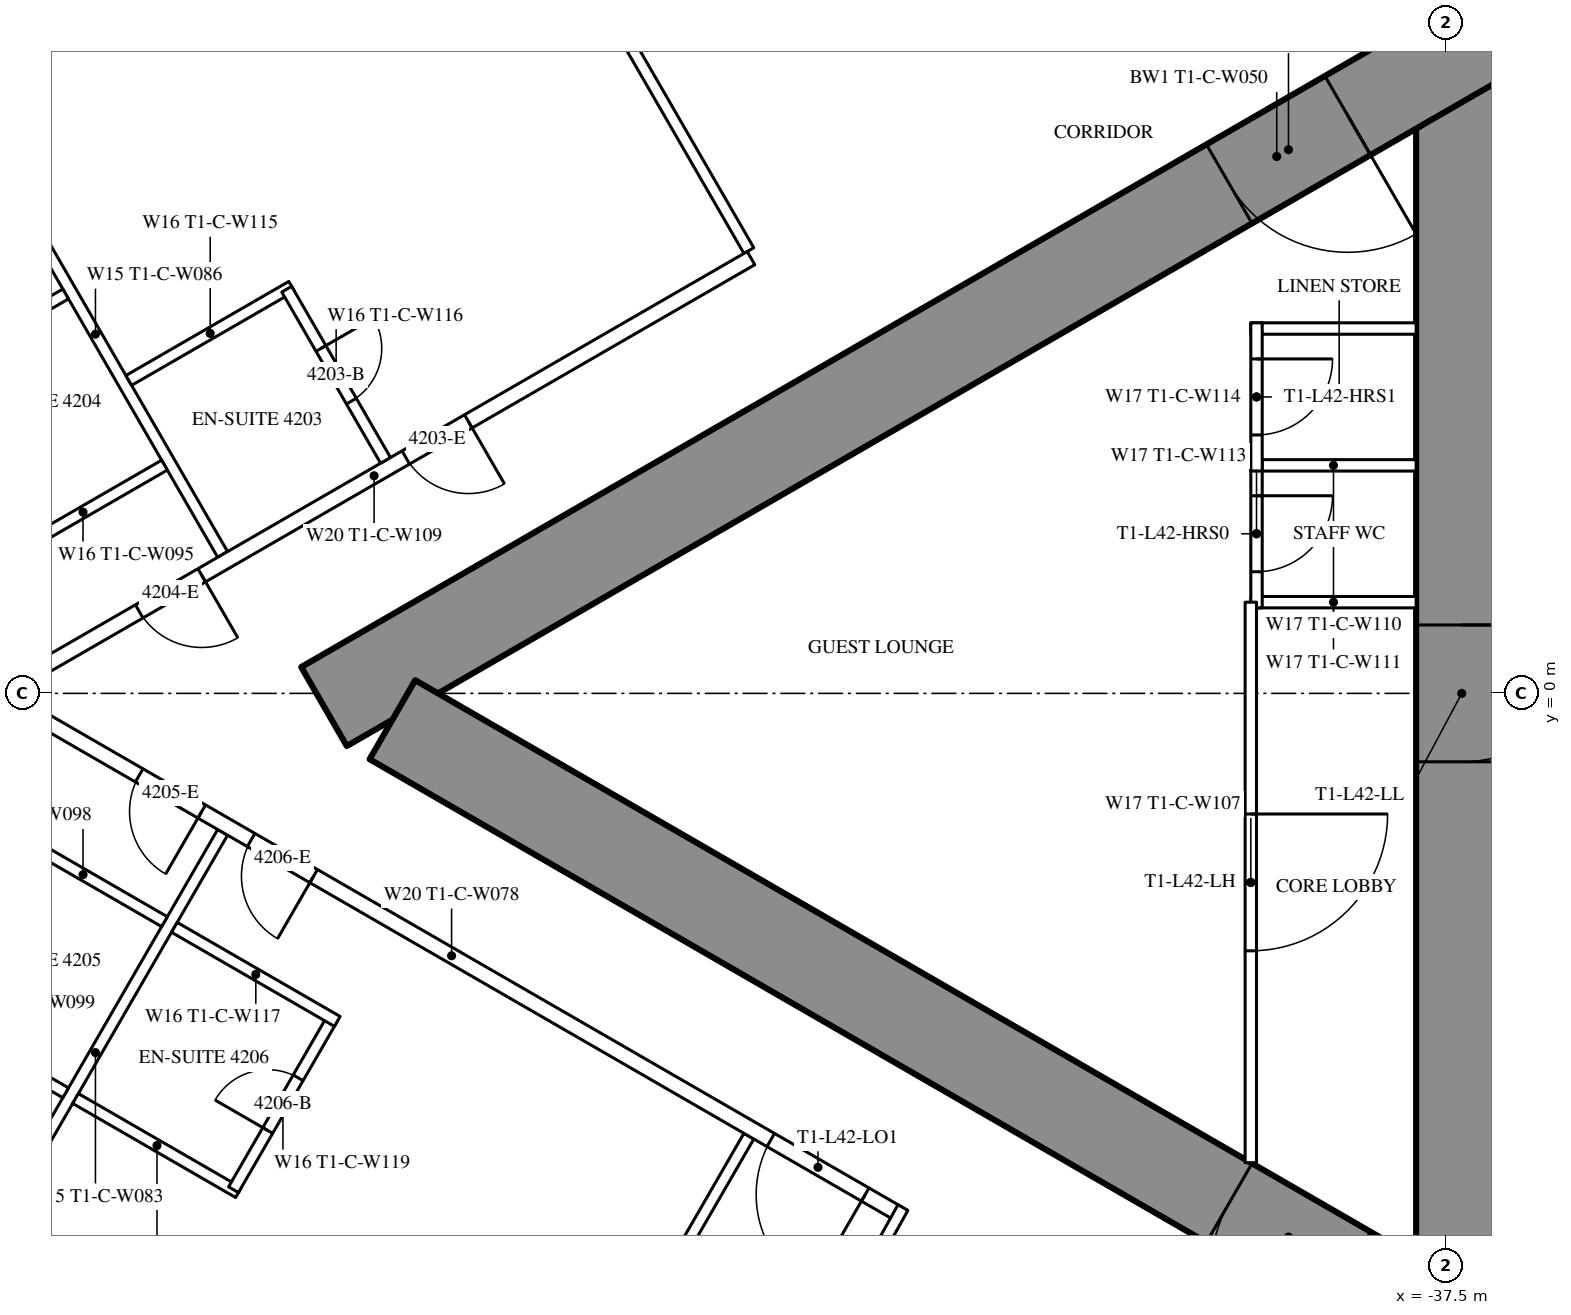
"""IFC4 building model, lengths in metres.
Left out: names, types, materials, properties, quantities, classifications, styles, units other than length and angle.
Written with IfcOpenShell. Run it as: python <this file> out.ifc"""

import sys

from ifc_helpers import new_model, si_unit, direction, frame, frame_2d, origin, place, context, subcontext, project, spatial, rectangle, extrude, element, fill, save


model = new_model("IFC4")
c1 = context("Model", 3, precision=1e-05, world=origin(), true_north=direction((0.0, 1.0)))
c2 = subcontext(c1, "Body", "Model", "MODEL_VIEW")
j1 = project(units=[si_unit("LENGTHUNIT", "METRE"), si_unit("PLANEANGLEUNIT", "RADIAN")], contexts=[c1])
p1 = place(None, origin())
s1 = spatial("IfcSite", under=j1, at=p1, CompositionType="ELEMENT")
p2 = place(p1, origin())
s2 = spatial("IfcBuilding", under=s1, at=p2, CompositionType="ELEMENT")
p3 = place(p2, frame((0.0, 0.0, 159.8)))
s3 = spatial("IfcBuildingStorey", under=s2, at=p3, CompositionType="ELEMENT", Elevation=159.8)
p4 = place(p3, frame((-37.3, 8.6, 0.0), z_axis=(0.0, 0.0, 1.0), x_axis=(0.0, -1.0, 0.0)))
e1 = element("IfcWall", 1, at=p4, inside=s3, PredefinedType="SHEAR", context=c2, shape_type="SweptSolid", body=[
    extrude(rectangle(XDim=17.2, YDim=1.2, at=frame_2d((8.6, 0.0))), origin(), (0.0, 0.0, 1.0), 3.5),
])
p5 = place(p4, frame((7.7, 0.0, 0.0)))
e2 = element("IfcOpeningElement", 2, at=p5, cuts=e1, PredefinedType="OPENING", context=c2, shape_type="SweptSolid", body=[
    extrude(rectangle(XDim=1.8, YDim=2.2, at=frame_2d((0.9, 1.1))), frame((0.0, 0.61, 0.0), z_axis=(0.0, -1.0, 0.0), x_axis=(1.0, 0.0, 0.0)), (0.0, 0.0, 1.0), 1.22),
])
p6 = place(p3, frame((-27.2, 14.3, 0.0), z_axis=(0.0, 0.0, 1.0), x_axis=(-0.866026593062, -0.499997940104, 0.0)))
e3 = element("IfcWall", 3, at=p6, inside=s3, PredefinedType="SHEAR", context=c2, shape_type="SweptSolid", body=[
    extrude(rectangle(XDim=28.946, YDim=1.2, at=frame_2d((14.473, 0.0))), origin(), (0.0, 0.0, 1.0), 3.5),
])
p7 = place(p6, frame((4.6, 0.0, 0.0)))
e4 = element("IfcOpeningElement", 4, at=p7, cuts=e3, PredefinedType="OPENING", context=c2, shape_type="SweptSolid", body=[
    extrude(rectangle(XDim=1.0, YDim=2.2, at=frame_2d((0.5, 1.1))), frame((0.0, 0.61, 0.0), z_axis=(0.0, -1.0, 0.0), x_axis=(1.0, 0.0, 0.0)), (0.0, 0.0, 1.0), 1.22),
])
p8 = place(p6, frame((13.395, 0.0, 0.0)))
e5 = element("IfcOpeningElement", 5, at=p8, cuts=e3, PredefinedType="OPENING", context=c2, shape_type="SweptSolid", body=[
    extrude(rectangle(XDim=1.8, YDim=2.2, at=frame_2d((0.9, 1.1))), frame((0.0, 0.61, 0.0), z_axis=(0.0, -1.0, 0.0), x_axis=(1.0, 0.0, 0.0)), (0.0, 0.0, 1.0), 1.22),
])
p9 = place(p3, frame((-27.2, -14.3, 0.0), z_axis=(0.0, 0.0, 1.0), x_axis=(-0.866024021859, 0.500002393557, 0.0)))
e6 = element("IfcWall", 6, at=p9, inside=s3, PredefinedType="SHEAR", context=c2, shape_type="SweptSolid", body=[
    extrude(rectangle(XDim=27.907, YDim=1.2, at=frame_2d((13.954, 0.0))), origin(), (0.0, 0.0, 1.0), 3.5),
])
p10 = place(p9, frame((4.6, 0.0, 0.0)))
e7 = element("IfcOpeningElement", 7, at=p10, cuts=e6, PredefinedType="OPENING", context=c2, shape_type="SweptSolid", body=[
    extrude(rectangle(XDim=1.0, YDim=2.2, at=frame_2d((0.5, 1.1))), frame((0.0, 0.61, 0.0), z_axis=(0.0, -1.0, 0.0), x_axis=(1.0, 0.0, 0.0)), (0.0, 0.0, 1.0), 1.22),
])
p11 = place(p9, frame((13.395, 0.0, 0.0)))
e8 = element("IfcOpeningElement", 8, at=p11, cuts=e6, PredefinedType="OPENING", context=c2, shape_type="SweptSolid", body=[
    extrude(rectangle(XDim=1.8, YDim=2.2, at=frame_2d((0.9, 1.1))), frame((0.0, 0.61, 0.0), z_axis=(0.0, -1.0, 0.0), x_axis=(1.0, 0.0, 0.0)), (0.0, 0.0, 1.0), 1.22),
])
p12 = place(p3, frame((-46.679, 5.825, 0.0), z_axis=(0.0, 0.0, 1.0), x_axis=(-0.500006839597, 0.866021454905, 0.0)))
e9 = element("IfcWall", 9, at=p12, inside=s3, PredefinedType="PARTITIONING", context=c2, shape_type="SweptSolid", body=[
    extrude(rectangle(XDim=6.911, YDim=0.15, at=frame_2d((3.456, 0.0))), origin(), (0.0, 0.0, 1.0), 2.3),
])
p13 = place(p3, frame((-53.602, 1.828, 0.0), z_axis=(0.0, 0.0, 1.0), x_axis=(-0.49999191814, 0.866030069798, 0.0)))
e10 = element("IfcWall", 10, at=p13, inside=s3, PredefinedType="PARTITIONING", context=c2, shape_type="SweptSolid", body=[
    extrude(rectangle(XDim=6.692, YDim=0.15, at=frame_2d((3.346, 0.0))), origin(), (0.0, 0.0, 1.0), 2.3),
])
p14 = place(p3, frame((-46.679, -5.825, 0.0), z_axis=(0.0, 0.0, 1.0), x_axis=(-0.500006839597, -0.866021454905, 0.0)))
e11 = element("IfcWall", 11, at=p14, inside=s3, PredefinedType="PARTITIONING", context=c2, shape_type="SweptSolid", body=[
    extrude(rectangle(XDim=6.911, YDim=0.15, at=frame_2d((3.456, 0.0))), origin(), (0.0, 0.0, 1.0), 2.3),
])
p15 = place(p3, frame((-53.602, -1.828, 0.0), z_axis=(0.0, 0.0, 1.0), x_axis=(-0.49999191814, -0.866030069798, 0.0)))
e12 = element("IfcWall", 12, at=p15, inside=s3, PredefinedType="PARTITIONING", context=c2, shape_type="SweptSolid", body=[
    extrude(rectangle(XDim=6.692, YDim=0.15, at=frame_2d((3.346, 0.0))), origin(), (0.0, 0.0, 1.0), 2.3),
])
p16 = place(p3, frame((-44.715, -6.844, 0.0), z_axis=(0.0, 0.0, 1.0), x_axis=(-0.866025261224, 0.500000246922, 0.0)))
e13 = element("IfcWall", 13, at=p16, inside=s3, PredefinedType="PARTITIONING", context=c2, shape_type="SweptSolid", body=[
    extrude(rectangle(XDim=13.567, YDim=0.2, at=frame_2d((6.783, 0.0))), origin(), (0.0, 0.0, 1.0), 3.25),
])
p17 = place(p16, frame((10.579, 0.0, 0.0)))
e14 = element("IfcOpeningElement", 14, at=p17, cuts=e13, PredefinedType="OPENING", context=c2, shape_type="SweptSolid", body=[
    extrude(rectangle(XDim=0.95, YDim=2.2, at=frame_2d((0.475, 1.1))), frame((0.0, 0.11, 0.0), z_axis=(0.0, -1.0, 0.0), x_axis=(1.0, 0.0, 0.0)), (0.0, 0.0, 1.0), 0.22),
])
p18 = place(p16, frame((8.879, 0.0, 0.0)))
e15 = element("IfcOpeningElement", 15, at=p18, cuts=e13, PredefinedType="OPENING", context=c2, shape_type="SweptSolid", body=[
    extrude(rectangle(XDim=0.95, YDim=2.2, at=frame_2d((0.475, 1.1))), frame((0.0, 0.11, 0.0), z_axis=(0.0, -1.0, 0.0), x_axis=(1.0, 0.0, 0.0)), (0.0, 0.0, 1.0), 0.22),
])
p19 = place(p16, frame((0.5, 0.0, 0.0)))
e16 = element("IfcOpeningElement", 16, at=p19, cuts=e13, PredefinedType="OPENING", context=c2, shape_type="SweptSolid", body=[
    extrude(rectangle(XDim=1.435, YDim=2.2, at=frame_2d((0.718, 1.1))), frame((0.0, 0.11, 0.0), z_axis=(0.0, -1.0, 0.0), x_axis=(1.0, 0.0, 0.0)), (0.0, 0.0, 1.0), 0.22),
])
p20 = place(p3, frame((-44.652, -6.764, 0.0), z_axis=(0.0, 0.0, 1.0), x_axis=(-0.485424724123, -0.874278466629, 0.0)))
e17 = element("IfcWall", 17, at=p20, inside=s3, PredefinedType="PARTITIONING", context=c2, shape_type="SweptSolid", body=[
    extrude(rectangle(XDim=1.805, YDim=0.15, at=frame_2d((0.903, 0.0))), origin(), (0.0, 0.0, 1.0), 3.25),
])
p21 = place(p3, frame((-46.65, 5.726, 0.0), z_axis=(0.0, 0.0, 1.0), x_axis=(-0.866027963864, -0.499995565786, 0.0)))
e18 = element("IfcWall", 18, at=p21, inside=s3, PredefinedType="PARTITIONING", context=c2, shape_type="SweptSolid", body=[
    extrude(rectangle(XDim=11.452, YDim=0.2, at=frame_2d((5.726, 0.0))), origin(), (0.0, 0.0, 1.0), 3.25),
])
p22 = place(p21, frame((4.294, 0.0, 0.0)))
e19 = element("IfcOpeningElement", 19, at=p22, cuts=e18, PredefinedType="OPENING", context=c2, shape_type="SweptSolid", body=[
    extrude(rectangle(XDim=0.95, YDim=2.2, at=frame_2d((0.475, 1.1))), frame((0.0, 0.11, 0.0), z_axis=(0.0, -1.0, 0.0), x_axis=(1.0, 0.0, 0.0)), (0.0, 0.0, 1.0), 0.22),
])
p23 = place(p21, frame((8.344, 0.0, 0.0)))
e20 = element("IfcOpeningElement", 20, at=p23, cuts=e18, PredefinedType="OPENING", context=c2, shape_type="SweptSolid", body=[
    extrude(rectangle(XDim=0.95, YDim=2.2, at=frame_2d((0.475, 1.1))), frame((0.0, 0.11, 0.0), z_axis=(0.0, -1.0, 0.0), x_axis=(1.0, 0.0, 0.0)), (0.0, 0.0, 1.0), 0.22),
])
p24 = place(p3, frame((-52.694, 5.355, 0.0), z_axis=(0.0, 0.0, 1.0), x_axis=(-0.866031185235, -0.4999899861, 0.0)))
e21 = element("IfcWall", 21, at=p24, inside=s3, PredefinedType="PARTITIONING", context=c2, shape_type="SweptSolid", body=[
    extrude(rectangle(XDim=2.475, YDim=0.15, at=frame_2d((1.238, 0.0))), origin(), (0.0, 0.0, 1.0), 3.25),
])
p25 = place(p3, frame((-51.459, 3.065, 0.0), z_axis=(0.0, 0.0, 1.0), x_axis=(-0.499936506574, 0.866062058628, 0.0)))
e22 = element("IfcWall", 22, at=p25, inside=s3, PredefinedType="PARTITIONING", context=c2, shape_type="SweptSolid", body=[
    extrude(rectangle(XDim=2.6, YDim=0.15, at=frame_2d((1.3, 0.0))), origin(), (0.0, 0.0, 1.0), 3.25),
])
p26 = place(p25, frame((0.9, 0.0, 0.0)))
e23 = element("IfcOpeningElement", 23, at=p26, cuts=e22, PredefinedType="OPENING", context=c2, shape_type="SweptSolid", body=[
    extrude(rectangle(XDim=0.8, YDim=2.2, at=frame_2d((0.4, 1.1))), frame((0.0, 0.085, 0.0), z_axis=(0.0, -1.0, 0.0), x_axis=(1.0, 0.0, 0.0)), (0.0, 0.0, 1.0), 0.17),
])
p27 = place(p3, frame((-55.667, 5.255, 0.0), z_axis=(0.0, 0.0, 1.0), x_axis=(-0.866006523861, -0.500032699561, 0.0)))
e24 = element("IfcWall", 24, at=p27, inside=s3, PredefinedType="PARTITIONING", context=c2, shape_type="SweptSolid", body=[
    extrude(rectangle(XDim=2.475, YDim=0.15, at=frame_2d((1.237, 0.0))), origin(), (0.0, 0.0, 1.0), 3.25),
])
p28 = place(p3, frame((-54.367, 3.003, 0.0), z_axis=(0.0, 0.0, 1.0), x_axis=(-0.866031185235, -0.4999899861, 0.0)))
e25 = element("IfcWall", 25, at=p28, inside=s3, PredefinedType="PARTITIONING", context=c2, shape_type="SweptSolid", body=[
    extrude(rectangle(XDim=2.475, YDim=0.15, at=frame_2d((1.238, 0.0))), origin(), (0.0, 0.0, 1.0), 3.25),
])
p29 = place(p3, frame((-55.667, -5.255, 0.0), z_axis=(0.0, 0.0, 1.0), x_axis=(-0.866006523861, 0.500032699561, 0.0)))
e26 = element("IfcWall", 26, at=p29, inside=s3, PredefinedType="PARTITIONING", context=c2, shape_type="SweptSolid", body=[
    extrude(rectangle(XDim=2.475, YDim=0.15, at=frame_2d((1.237, 0.0))), origin(), (0.0, 0.0, 1.0), 3.25),
])
for number, where, z_axis, x_axis in (
    (27, (-54.367, -3.003, 0.0), (0.0, 0.0, 1.0), (-0.866, 0.5, 0.0)),
    (28, (-53.394, -6.567, 0.0), (0.0, 0.0, 1.0), (-0.866, 0.5, 0.0)),
):
    element("IfcWall", number, at=place(p3, frame(where, z_axis=z_axis, x_axis=x_axis)), inside=s3, PredefinedType="PARTITIONING", context=c2, shape_type="SweptSolid", body=[
        extrude(rectangle(XDim=2.475, YDim=0.15, at=frame_2d((1.238, 0.0))), origin(), (0.0, 0.0, 1.0), 3.25),
    ])
p30 = place(p3, frame((-52.159, -4.278, 0.0), z_axis=(0.0, 0.0, 1.0), x_axis=(-0.500047596559, -0.865997922154, 0.0)))
e29 = element("IfcWall", 29, at=p30, inside=s3, PredefinedType="PARTITIONING", context=c2, shape_type="SweptSolid", body=[
    extrude(rectangle(XDim=2.6, YDim=0.15, at=frame_2d((1.3, 0.0))), origin(), (0.0, 0.0, 1.0), 3.25),
])
p31 = place(p30, frame((0.9, 0.0, 0.0)))
e30 = element("IfcOpeningElement", 30, at=p31, cuts=e29, PredefinedType="OPENING", context=c2, shape_type="SweptSolid", body=[
    extrude(rectangle(XDim=0.8, YDim=2.2, at=frame_2d((0.4, 1.1))), frame((0.0, 0.085, 0.0), z_axis=(0.0, -1.0, 0.0), x_axis=(1.0, 0.0, 0.0)), (0.0, 0.0, 1.0), 0.17),
])
p32 = place(p3, frame((-52.094, -4.315, 0.0), z_axis=(0.0, 0.0, 1.0), x_axis=(-0.866006523861, 0.500032699561, 0.0)))
e31 = element("IfcWall", 31, at=p32, inside=s3, PredefinedType="PARTITIONING", context=c2, shape_type="SweptSolid", body=[
    extrude(rectangle(XDim=2.475, YDim=0.15, at=frame_2d((1.237, 0.0))), origin(), (0.0, 0.0, 1.0), 2.45),
])
for number, where, z_axis, x_axis in (
    (32, (-37.9, 1.2, 0.0), (0.0, 0.0, 1.0), (-1.0, 0.0, 0.0)),
    (33, (-37.9, 3.0, 0.0), (0.0, 0.0, 1.0), (-1.0, 0.0, 0.0)),
    (34, (-37.9, 4.8, 0.0), (0.0, 0.0, 1.0), (-1.0, 0.0, 0.0)),
):
    element("IfcWall", number, at=place(p3, frame(where, z_axis=z_axis, x_axis=x_axis)), inside=s3, PredefinedType="PARTITIONING", context=c2, shape_type="SweptSolid", body=[
        extrude(rectangle(XDim=2.175, YDim=0.15, at=frame_2d((1.087, 0.0))), origin(), (0.0, 0.0, 1.0), 3.25),
    ])
p33 = place(p3, frame((-40.0, 3.075, 0.0), z_axis=(0.0, 0.0, 1.0), x_axis=(0.0, -1.0, 0.0)))
e35 = element("IfcWall", 35, at=p33, inside=s3, PredefinedType="PARTITIONING", context=c2, shape_type="SweptSolid", body=[
    extrude(rectangle(XDim=1.95, YDim=0.15, at=frame_2d((0.975, 0.0))), origin(), (0.0, 0.0, 1.0), 3.25),
])
p34 = place(p33, frame((0.475, 0.0, 0.0)))
e36 = element("IfcOpeningElement", 36, at=p34, cuts=e35, PredefinedType="OPENING", context=c2, shape_type="SweptSolid", body=[
    extrude(rectangle(XDim=1.0, YDim=2.2, at=frame_2d((0.5, 1.1))), frame((0.0, 0.085, 0.0), z_axis=(0.0, -1.0, 0.0), x_axis=(1.0, 0.0, 0.0)), (0.0, 0.0, 1.0), 0.17),
])
p35 = place(p3, frame((-40.0, 4.875, 0.0), z_axis=(0.0, 0.0, 1.0), x_axis=(0.0, -1.0, 0.0)))
e37 = element("IfcWall", 37, at=p35, inside=s3, PredefinedType="PARTITIONING", context=c2, shape_type="SweptSolid", body=[
    extrude(rectangle(XDim=1.95, YDim=0.15, at=frame_2d((0.975, 0.0))), origin(), (0.0, 0.0, 1.0), 3.25),
])
p36 = place(p35, frame((0.475, 0.0, 0.0)))
e38 = element("IfcOpeningElement", 38, at=p36, cuts=e37, PredefinedType="OPENING", context=c2, shape_type="SweptSolid", body=[
    extrude(rectangle(XDim=1.0, YDim=2.2, at=frame_2d((0.5, 1.1))), frame((0.0, 0.085, 0.0), z_axis=(0.0, -1.0, 0.0), x_axis=(1.0, 0.0, 0.0)), (0.0, 0.0, 1.0), 0.17),
])
p37 = place(p3, frame((-40.075, 1.2, 0.0), z_axis=(0.0, 0.0, 1.0), x_axis=(0.0, -1.0, 0.0)))
e39 = element("IfcWall", 39, at=p37, inside=s3, PredefinedType="PARTITIONING", context=c2, shape_type="SweptSolid", body=[
    extrude(rectangle(XDim=7.374, YDim=0.15, at=frame_2d((3.687, 0.0))), origin(), (0.0, 0.0, 1.0), 3.25),
])
p38 = place(p37, frame((2.787, 0.0, 0.0)))
e40 = element("IfcOpeningElement", 40, at=p38, cuts=e39, PredefinedType="OPENING", context=c2, shape_type="SweptSolid", body=[
    extrude(rectangle(XDim=1.8, YDim=2.2, at=frame_2d((0.9, 1.1))), frame((0.0, 0.085, 0.0), z_axis=(0.0, -1.0, 0.0), x_axis=(1.0, 0.0, 0.0)), (0.0, 0.0, 1.0), 0.17),
])
p39 = place(p26, origin())
e41 = element("IfcDoor", 41, at=p39, inside=s3, OperationType="SINGLE_SWING_RIGHT", PredefinedType="DOOR", context=c2, shape_type="SweptSolid", body=[
    extrude(rectangle(XDim=0.8, YDim=2.2, at=frame_2d((0.4, 1.1))), frame((0.0, 0.025, 0.0), z_axis=(0.0, -1.0, 0.0), x_axis=(1.0, 0.0, 0.0)), (0.0, 0.0, 1.0), 0.05),
])
fill(e23, e41)
p40 = place(p22, origin())
e42 = element("IfcDoor", 42, at=p40, inside=s3, OperationType="SINGLE_SWING_LEFT", PredefinedType="DOOR", context=c2, shape_type="SweptSolid", body=[
    extrude(rectangle(XDim=0.95, YDim=2.2, at=frame_2d((0.475, 1.1))), frame((0.0, 0.025, 0.0), z_axis=(0.0, -1.0, 0.0), x_axis=(1.0, 0.0, 0.0)), (0.0, 0.0, 1.0), 0.05),
])
fill(e19, e42)
p41 = place(p23, origin())
e43 = element("IfcDoor", 43, at=p41, inside=s3, OperationType="SINGLE_SWING_LEFT", PredefinedType="DOOR", context=c2, shape_type="SweptSolid", body=[
    extrude(rectangle(XDim=0.95, YDim=2.2, at=frame_2d((0.475, 1.1))), frame((0.0, 0.025, 0.0), z_axis=(0.0, -1.0, 0.0), x_axis=(1.0, 0.0, 0.0)), (0.0, 0.0, 1.0), 0.05),
])
fill(e20, e43)
p42 = place(p17, origin())
e44 = element("IfcDoor", 44, at=p42, inside=s3, OperationType="SINGLE_SWING_LEFT", PredefinedType="DOOR", context=c2, shape_type="SweptSolid", body=[
    extrude(rectangle(XDim=0.95, YDim=2.2, at=frame_2d((0.475, 1.1))), frame((0.0, 0.025, 0.0), z_axis=(0.0, -1.0, 0.0), x_axis=(1.0, 0.0, 0.0)), (0.0, 0.0, 1.0), 0.05),
])
fill(e14, e44)
p43 = place(p31, origin())
e45 = element("IfcDoor", 45, at=p43, inside=s3, OperationType="SINGLE_SWING_RIGHT", PredefinedType="DOOR", context=c2, shape_type="SweptSolid", body=[
    extrude(rectangle(XDim=0.8, YDim=2.2, at=frame_2d((0.4, 1.1))), frame((0.0, 0.025, 0.0), z_axis=(0.0, -1.0, 0.0), x_axis=(1.0, 0.0, 0.0)), (0.0, 0.0, 1.0), 0.05),
])
fill(e30, e45)
p44 = place(p18, origin())
e46 = element("IfcDoor", 46, at=p44, inside=s3, OperationType="SINGLE_SWING_LEFT", PredefinedType="DOOR", context=c2, shape_type="SweptSolid", body=[
    extrude(rectangle(XDim=0.95, YDim=2.2, at=frame_2d((0.475, 1.1))), frame((0.0, 0.025, 0.0), z_axis=(0.0, -1.0, 0.0), x_axis=(1.0, 0.0, 0.0)), (0.0, 0.0, 1.0), 0.05),
])
fill(e15, e46)
p45 = place(p19, origin())
e47 = element("IfcDoor", 47, at=p45, inside=s3, OperationType="SINGLE_SWING_LEFT", PredefinedType="DOOR", context=c2, shape_type="SweptSolid", body=[
    extrude(rectangle(XDim=1.435, YDim=2.2, at=frame_2d((0.718, 1.1))), frame((0.0, 0.025, 0.0), z_axis=(0.0, -1.0, 0.0), x_axis=(1.0, 0.0, 0.0)), (0.0, 0.0, 1.0), 0.05),
])
fill(e16, e47)
p46 = place(p34, origin())
e48 = element("IfcDoor", 48, at=p46, inside=s3, OperationType="SINGLE_SWING_LEFT", PredefinedType="DOOR", context=c2, shape_type="SweptSolid", body=[
    extrude(rectangle(XDim=1.0, YDim=2.2, at=frame_2d((0.5, 1.1))), frame((0.0, 0.025, 0.0), z_axis=(0.0, -1.0, 0.0), x_axis=(1.0, 0.0, 0.0)), (0.0, 0.0, 1.0), 0.05),
])
fill(e36, e48)
p47 = place(p36, origin())
e49 = element("IfcDoor", 49, at=p47, inside=s3, OperationType="SINGLE_SWING_LEFT", PredefinedType="DOOR", context=c2, shape_type="SweptSolid", body=[
    extrude(rectangle(XDim=1.0, YDim=2.2, at=frame_2d((0.5, 1.1))), frame((0.0, 0.025, 0.0), z_axis=(0.0, -1.0, 0.0), x_axis=(1.0, 0.0, 0.0)), (0.0, 0.0, 1.0), 0.05),
])
fill(e38, e49)
p48 = place(p38, origin())
e50 = element("IfcDoor", 50, at=p48, inside=s3, OperationType="DOUBLE_DOOR_SINGLE_SWING", PredefinedType="DOOR", context=c2, shape_type="SweptSolid", body=[
    extrude(rectangle(XDim=1.8, YDim=2.2, at=frame_2d((0.9, 1.1))), frame((0.0, 0.025, 0.0), z_axis=(0.0, -1.0, 0.0), x_axis=(1.0, 0.0, 0.0)), (0.0, 0.0, 1.0), 0.05),
])
fill(e40, e50)
p49 = place(p8, origin())
e51 = element("IfcDoor", 51, at=p49, inside=s3, OperationType="DOUBLE_DOOR_SINGLE_SWING", PredefinedType="DOOR", context=c2, shape_type="SweptSolid", body=[
    extrude(rectangle(XDim=1.8, YDim=2.2, at=frame_2d((0.9, 1.1))), frame((0.0, 0.025, 0.0), z_axis=(0.0, -1.0, 0.0), x_axis=(1.0, 0.0, 0.0)), (0.0, 0.0, 1.0), 0.05),
])
fill(e5, e51)
p50 = place(p11, origin())
e52 = element("IfcDoor", 52, at=p50, inside=s3, OperationType="DOUBLE_DOOR_SINGLE_SWING", PredefinedType="DOOR", context=c2, shape_type="SweptSolid", body=[
    extrude(rectangle(XDim=1.8, YDim=2.2, at=frame_2d((0.9, 1.1))), frame((0.0, 0.025, 0.0), z_axis=(0.0, -1.0, 0.0), x_axis=(1.0, 0.0, 0.0)), (0.0, 0.0, 1.0), 0.05),
])
fill(e8, e52)
p51 = place(p5, origin())
e53 = element("IfcDoor", 53, at=p51, inside=s3, OperationType="DOUBLE_DOOR_SINGLE_SWING", PredefinedType="DOOR", context=c2, shape_type="SweptSolid", body=[
    extrude(rectangle(XDim=1.8, YDim=2.2, at=frame_2d((0.9, 1.1))), frame((0.0, 0.025, 0.0), z_axis=(0.0, -1.0, 0.0), x_axis=(1.0, 0.0, 0.0)), (0.0, 0.0, 1.0), 0.05),
])
fill(e2, e53)
save(model, sys.argv[1])
